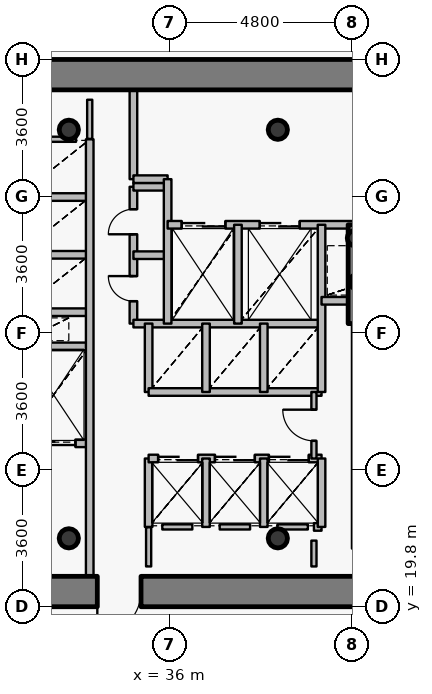
"""IFC4 building model, lengths in metres.
Left out: names, types, materials, properties, quantities, classifications, styles, units other than length and angle.
Written with IfcOpenShell. Run it as: python <this file> out.ifc"""

import sys

from ifc_helpers import new_model, si_unit, direction, frame, frame_2d, origin, origin_2d, place, context, subcontext, project, spatial, rectangle, hollow_circle, extrude, source, transform, mapped, element, fill, save


model = new_model("IFC4")
c1 = context("Model", 3, precision=1e-05, world=origin(), true_north=direction((0.0, 1.0)))
c2 = subcontext(c1, "Body", "Model", "MODEL_VIEW")
j1 = project(units=[si_unit("LENGTHUNIT", "METRE"), si_unit("PLANEANGLEUNIT", "RADIAN")], contexts=[c1])
p1 = place(None, origin())
s1 = spatial("IfcSite", under=j1, at=p1, CompositionType="ELEMENT")
p2 = place(p1, origin())
s2 = spatial("IfcBuilding", under=s1, at=p2, CompositionType="ELEMENT")
p3 = place(p2, frame((0.0, 0.0, 108.45)))
s3 = spatial("IfcBuildingStorey", under=s2, at=p3, CompositionType="ELEMENT", Elevation=108.45)
for number, where, z_axis, x_axis in (
    (1, (33.35, 21.6, 0.0), (0.0, 0.0, 1.0), (1.0, 0.0, 0.0)),
    (2, (38.85, 21.6, 0.0), (0.0, 0.0, 1.0), (1.0, 0.0, 0.0)),
    (3, (38.85, 32.35, 0.0), (0.0, 0.0, 1.0), (1.0, 0.0, 0.0)),
    (4, (33.35, 32.35, 0.0), (0.0, 0.0, 1.0), (1.0, 0.0, 0.0)),
):
    element("IfcColumn", number, at=place(p3, frame(where, z_axis=z_axis, x_axis=x_axis)), inside=s3, PredefinedType="COLUMN", context=c2, shape_type="SweptSolid", body=[
        extrude(hollow_circle(Radius=0.254, WallThickness=0.02, at=origin_2d()), origin(), (0.0, 0.0, 1.0), 3.75),
    ])
for number, where, z_axis, x_axis in (
    (5, (40.95, 28.35, 0.0), (0.0, 0.0, 1.0), (1.0, 0.0, 0.0)),
    (6, (40.88, 29.5, 0.0), (0.0, 0.0, 1.0), (1.0, 0.0, 0.0)),
):
    element("IfcColumn", number, at=place(p3, frame(where, z_axis=z_axis, x_axis=x_axis)), inside=s3, PredefinedType="COLUMN", context=c2, shape_type="SweptSolid", body=[
        extrude(hollow_circle(Radius=0.203, WallThickness=0.016, at=origin_2d()), origin(), (0.0, 0.0, 1.0), 3.75),
    ])
p4 = place(p3, frame((26.6, 33.8, 0.0), z_axis=(0.0, 0.0, 1.0), x_axis=(1.0, 0.0, 0.0)))
e7 = element("IfcWall", 7, at=p4, inside=s3, PredefinedType="SHEAR", context=c2, shape_type="SweptSolid", body=[
    extrude(rectangle(XDim=18.8, YDim=0.8, at=frame_2d((9.4, 0.0))), origin(), (0.0, 0.0, 1.0), 2.95),
])
p5 = place(p3, frame((45.4, 20.2, 0.0), z_axis=(0.0, 0.0, 1.0), x_axis=(-1.0, 0.0, 0.0)))
e8 = element("IfcWall", 8, at=p5, inside=s3, PredefinedType="SHEAR", context=c2, shape_type="SweptSolid", body=[
    extrude(rectangle(XDim=18.8, YDim=0.8, at=frame_2d((9.4, 0.0))), origin(), (0.0, 0.0, 1.0), 2.95),
])
p6 = place(p5, frame((10.15, 0.0, 0.0)))
e9 = element("IfcOpeningElement", 9, at=p6, cuts=e8, PredefinedType="OPENING", context=c2, shape_type="SweptSolid", body=[
    extrude(rectangle(XDim=1.15, YDim=2.15, at=origin_2d()), frame((0.575, 0.41, 1.075), z_axis=(0.0, -1.0, 0.0), x_axis=(1.0, 0.0, 0.0)), (0.0, 0.0, 1.0), 0.82),
])
p7 = place(p3, frame((40.9, 27.25, 0.0), z_axis=(0.0, 0.0, 1.0), x_axis=(0.0, 1.0, 0.0)))
e10 = element("IfcWall", 10, at=p7, inside=s3, PredefinedType="SHEAR", context=c2, shape_type="SweptSolid", body=[
    extrude(rectangle(XDim=2.6, YDim=0.4, at=frame_2d((1.3, 0.0))), origin(), (0.0, 0.0, 1.0), 3.1),
])
p8 = place(p3, frame((32.0, 24.1, 0.0), z_axis=(0.0, 0.0, 1.0), x_axis=(1.0, 0.0, 0.0)))
e11 = element("IfcWall", 11, at=p8, inside=s3, PredefinedType="PARTITIONING", context=c2, shape_type="SweptSolid", body=[
    extrude(rectangle(XDim=1.9, YDim=0.2, at=frame_2d((0.95, 0.0))), origin(), (0.0, 0.0, 1.0), 3.085),
])
p9 = place(p8, frame((0.375, 0.0, 0.0)))
e12 = element("IfcOpeningElement", 12, at=p9, cuts=e11, PredefinedType="OPENING", context=c2, shape_type="SweptSolid", body=[
    extrude(rectangle(XDim=1.15, YDim=2.15, at=origin_2d()), frame((0.575, 0.11, 1.075), z_axis=(0.0, -1.0, 0.0), x_axis=(1.0, 0.0, 0.0)), (0.0, 0.0, 1.0), 0.22),
])
for number, where, z_axis, x_axis in (
    (13, (32.0, 26.65, 0.0), (0.0, 0.0, 1.0), (1.0, 0.0, 0.0)),
    (14, (32.0, 27.55, 0.0), (0.0, 0.0, 1.0), (1.0, 0.0, 0.0)),
    (15, (32.0, 29.06, 0.0), (0.0, 0.0, 1.0), (1.0, 0.0, 0.0)),
    (16, (32.0, 30.58, 0.0), (0.0, 0.0, 1.0), (1.0, 0.0, 0.0)),
):
    element("IfcWall", number, at=place(p3, frame(where, z_axis=z_axis, x_axis=x_axis)), inside=s3, PredefinedType="PARTITIONING", context=c2, shape_type="SweptSolid", body=[
        extrude(rectangle(XDim=1.9, YDim=0.2, at=frame_2d((0.95, 0.0))), origin(), (0.0, 0.0, 1.0), 3.085),
    ])
p10 = place(p3, frame((33.9, 20.6, 0.0), z_axis=(0.0, 0.0, 1.0), x_axis=(0.0, 1.0, 0.0)))
e17 = element("IfcWall", 17, at=p10, inside=s3, PredefinedType="PARTITIONING", context=c2, shape_type="SweptSolid", body=[
    extrude(rectangle(XDim=11.5, YDim=0.2, at=frame_2d((5.75, 0.0))), origin(), (0.0, 0.0, 1.0), 3.085),
])
p11 = place(p3, frame((35.05, 27.25, 0.0), z_axis=(0.0, 0.0, 1.0), x_axis=(0.0, 1.0, 0.0)))
e18 = element("IfcWall", 18, at=p11, inside=s3, PredefinedType="PARTITIONING", context=c2, shape_type="SweptSolid", body=[
    extrude(rectangle(XDim=3.6, YDim=0.2, at=frame_2d((1.8, 0.0))), origin(), (0.0, 0.0, 1.0), 3.5),
])
p12 = place(p11, frame((0.59, 0.0, 0.0)))
e19 = element("IfcOpeningElement", 19, at=p12, cuts=e18, PredefinedType="OPENING", context=c2, shape_type="SweptSolid", body=[
    extrude(rectangle(XDim=0.66, YDim=2.05, at=origin_2d()), frame((0.33, 0.11, 1.025), z_axis=(0.0, -1.0, 0.0), x_axis=(1.0, 0.0, 0.0)), (0.0, 0.0, 1.0), 0.22),
])
p13 = place(p11, frame((2.35, 0.0, 0.0)))
e20 = element("IfcOpeningElement", 20, at=p13, cuts=e18, PredefinedType="OPENING", context=c2, shape_type="SweptSolid", body=[
    extrude(rectangle(XDim=0.66, YDim=2.05, at=origin_2d()), frame((0.33, 0.11, 1.025), z_axis=(0.0, -1.0, 0.0), x_axis=(1.0, 0.0, 0.0)), (0.0, 0.0, 1.0), 0.22),
])
p14 = place(p3, frame((35.05, 27.25, 0.0), z_axis=(0.0, 0.0, 1.0), x_axis=(1.0, 0.0, 0.0)))
e21 = element("IfcWall", 21, at=p14, inside=s3, PredefinedType="PARTITIONING", context=c2, shape_type="SweptSolid", body=[
    extrude(rectangle(XDim=4.95, YDim=0.2, at=frame_2d((2.475, 0.0))), origin(), (0.0, 0.0, 1.0), 3.085),
])
for number, where, z_axis, x_axis in (
    (22, (35.05, 29.05, 0.0), (0.0, 0.0, 1.0), (1.0, 0.0, 0.0)),
    (23, (35.05, 30.85, 0.0), (0.0, 0.0, 1.0), (1.0, 0.0, 0.0)),
):
    element("IfcWall", number, at=place(p3, frame(where, z_axis=z_axis, x_axis=x_axis)), inside=s3, PredefinedType="PARTITIONING", context=c2, shape_type="SweptSolid", body=[
        extrude(rectangle(XDim=0.9, YDim=0.2, at=frame_2d((0.45, 0.0))), origin(), (0.0, 0.0, 1.0), 3.5),
    ])
p15 = place(p3, frame((35.05, 31.05, 0.0), z_axis=(0.0, 0.0, 1.0), x_axis=(0.0, 1.0, 0.0)))
e24 = element("IfcWall", 24, at=p15, inside=s3, PredefinedType="PARTITIONING", context=c2, shape_type="SweptSolid", body=[
    extrude(rectangle(XDim=2.35, YDim=0.2, at=frame_2d((1.175, 0.0))), origin(), (0.0, 0.0, 1.0), 3.085),
])
p16 = place(p3, frame((35.05, 31.05, 0.0), z_axis=(0.0, 0.0, 1.0), x_axis=(1.0, 0.0, 0.0)))
e25 = element("IfcWall", 25, at=p16, inside=s3, PredefinedType="PARTITIONING", context=c2, shape_type="SweptSolid", body=[
    extrude(rectangle(XDim=0.9, YDim=0.2, at=frame_2d((0.45, 0.0))), origin(), (0.0, 0.0, 1.0), 3.5),
])
p17 = place(p3, frame((35.45, 21.9, 0.0), z_axis=(0.0, 0.0, 1.0), x_axis=(0.0, 1.0, 0.0)))
e26 = element("IfcWall", 26, at=p17, inside=s3, PredefinedType="PARTITIONING", context=c2, shape_type="SweptSolid", body=[
    extrude(rectangle(XDim=1.8, YDim=0.2, at=frame_2d((0.9, 0.0))), origin(), (0.0, 0.0, 1.0), 3.5),
])
p18 = place(p3, frame((35.45, 23.7, 0.0), z_axis=(0.0, 0.0, 1.0), x_axis=(1.0, 0.0, 0.0)))
e27 = element("IfcWall", 27, at=p18, inside=s3, PredefinedType="PARTITIONING", context=c2, shape_type="SweptSolid", body=[
    extrude(rectangle(XDim=4.55, YDim=0.2, at=frame_2d((2.275, 0.0))), origin(), (0.0, 0.0, 1.0), 3.085),
])
p19 = place(p18, frame((0.25, 0.0, 0.0)))
e28 = element("IfcOpeningElement", 28, at=p19, cuts=e27, PredefinedType="OPENING", context=c2, shape_type="SweptSolid", body=[
    extrude(rectangle(XDim=1.05, YDim=2.15, at=origin_2d()), frame((0.525, 0.11, 1.075), z_axis=(0.0, -1.0, 0.0), x_axis=(1.0, 0.0, 0.0)), (0.0, 0.0, 1.0), 0.22),
])
p20 = place(p18, frame((1.745, 0.0, 0.0)))
e29 = element("IfcOpeningElement", 29, at=p20, cuts=e27, PredefinedType="OPENING", context=c2, shape_type="SweptSolid", body=[
    extrude(rectangle(XDim=1.05, YDim=2.15, at=origin_2d()), frame((0.525, 0.11, 1.075), z_axis=(0.0, -1.0, 0.0), x_axis=(1.0, 0.0, 0.0)), (0.0, 0.0, 1.0), 0.22),
])
p21 = place(p18, frame((3.165, 0.0, 0.0)))
e30 = element("IfcOpeningElement", 30, at=p21, cuts=e27, PredefinedType="OPENING", context=c2, shape_type="SweptSolid", body=[
    extrude(rectangle(XDim=1.05, YDim=2.15, at=origin_2d()), frame((0.525, 0.11, 1.075), z_axis=(0.0, -1.0, 0.0), x_axis=(1.0, 0.0, 0.0)), (0.0, 0.0, 1.0), 0.22),
])
p22 = place(p3, frame((35.45, 25.45, 0.0), z_axis=(0.0, 0.0, 1.0), x_axis=(0.0, 1.0, 0.0)))
e31 = element("IfcWall", 31, at=p22, inside=s3, PredefinedType="PARTITIONING", context=c2, shape_type="SweptSolid", body=[
    extrude(rectangle(XDim=1.8, YDim=0.2, at=frame_2d((0.9, 0.0))), origin(), (0.0, 0.0, 1.0), 3.5),
])
p23 = place(p3, frame((35.45, 25.45, 0.0), z_axis=(0.0, 0.0, 1.0), x_axis=(1.0, 0.0, 0.0)))
e32 = element("IfcWall", 32, at=p23, inside=s3, PredefinedType="PARTITIONING", context=c2, shape_type="SweptSolid", body=[
    extrude(rectangle(XDim=4.55, YDim=0.2, at=frame_2d((2.275, 0.0))), origin(), (0.0, 0.0, 1.0), 3.085),
])
p24 = place(p3, frame((35.95, 27.25, 0.0), z_axis=(0.0, 0.0, 1.0), x_axis=(0.0, 1.0, 0.0)))
e33 = element("IfcWall", 33, at=p24, inside=s3, PredefinedType="PARTITIONING", context=c2, shape_type="SweptSolid", body=[
    extrude(rectangle(XDim=3.8, YDim=0.2, at=frame_2d((1.9, 0.0))), origin(), (0.0, 0.0, 1.0), 3.5),
])
p25 = place(p3, frame((35.95, 29.85, 0.0), z_axis=(0.0, 0.0, 1.0), x_axis=(1.0, 0.0, 0.0)))
e34 = element("IfcWall", 34, at=p25, inside=s3, PredefinedType="PARTITIONING", context=c2, shape_type="SweptSolid", body=[
    extrude(rectangle(XDim=8.49, YDim=0.2, at=frame_2d((4.245, 0.0))), origin(), (0.0, 0.0, 1.0), 3.085),
])
p26 = place(p25, frame((6.1, 0.0, 0.0)))
e35 = element("IfcOpeningElement", 35, at=p26, cuts=e34, PredefinedType="OPENING", context=c2, shape_type="SweptSolid", body=[
    extrude(rectangle(XDim=1.2, YDim=2.15, at=origin_2d()), frame((0.6, 0.11, 1.075), z_axis=(0.0, -1.0, 0.0), x_axis=(1.0, 0.0, 0.0)), (0.0, 0.0, 1.0), 0.22),
])
p27 = place(p25, frame((0.37, 0.0, 0.0)))
e36 = element("IfcOpeningElement", 36, at=p27, cuts=e34, PredefinedType="OPENING", context=c2, shape_type="SweptSolid", body=[
    extrude(rectangle(XDim=1.15, YDim=2.15, at=origin_2d()), frame((0.575, 0.11, 1.075), z_axis=(0.0, -1.0, 0.0), x_axis=(1.0, 0.0, 0.0)), (0.0, 0.0, 1.0), 0.22),
])
p28 = place(p25, frame((2.425, 0.0, 0.0)))
e37 = element("IfcOpeningElement", 37, at=p28, cuts=e34, PredefinedType="OPENING", context=c2, shape_type="SweptSolid", body=[
    extrude(rectangle(XDim=1.05, YDim=2.15, at=origin_2d()), frame((0.525, 0.11, 1.075), z_axis=(0.0, -1.0, 0.0), x_axis=(1.0, 0.0, 0.0)), (0.0, 0.0, 1.0), 0.22),
])
for number, where, z_axis, x_axis in (
    (38, (36.96, 21.9, 0.0), (0.0, 0.0, 1.0), (0.0, 1.0, 0.0)),
    (39, (36.96, 25.45, 0.0), (0.0, 0.0, 1.0), (0.0, 1.0, 0.0)),
):
    element("IfcWall", number, at=place(p3, frame(where, z_axis=z_axis, x_axis=x_axis)), inside=s3, PredefinedType="PARTITIONING", context=c2, shape_type="SweptSolid", body=[
        extrude(rectangle(XDim=1.8, YDim=0.2, at=frame_2d((0.9, 0.0))), origin(), (0.0, 0.0, 1.0), 3.5),
    ])
p29 = place(p3, frame((37.8, 27.25, 0.0), z_axis=(0.0, 0.0, 1.0), x_axis=(0.0, 1.0, 0.0)))
e40 = element("IfcWall", 40, at=p29, inside=s3, PredefinedType="PARTITIONING", context=c2, shape_type="SweptSolid", body=[
    extrude(rectangle(XDim=2.6, YDim=0.2, at=frame_2d((1.3, 0.0))), origin(), (0.0, 0.0, 1.0), 3.5),
])
for number, where, z_axis, x_axis in (
    (41, (38.48, 21.9, 0.0), (0.0, 0.0, 1.0), (0.0, 1.0, 0.0)),
    (42, (38.48, 25.45, 0.0), (0.0, 0.0, 1.0), (0.0, 1.0, 0.0)),
):
    element("IfcWall", number, at=place(p3, frame(where, z_axis=z_axis, x_axis=x_axis)), inside=s3, PredefinedType="PARTITIONING", context=c2, shape_type="SweptSolid", body=[
        extrude(rectangle(XDim=1.8, YDim=0.2, at=frame_2d((0.9, 0.0))), origin(), (0.0, 0.0, 1.0), 3.5),
    ])
p30 = place(p3, frame((39.8, 21.9, 0.0), z_axis=(0.0, 0.0, 1.0), x_axis=(1.0, 0.0, 0.0)))
e43 = element("IfcWall", 43, at=p30, inside=s3, PredefinedType="PARTITIONING", context=c2, shape_type="SweptSolid", body=[
    extrude(rectangle(XDim=0.2, YDim=0.2, at=frame_2d((0.1, 0.0))), origin(), (0.0, 0.0, 1.0), 3.5),
])
p31 = place(p3, frame((39.8, 23.7, 0.0), z_axis=(0.0, 0.0, 1.0), x_axis=(0.0, 1.0, 0.0)))
e44 = element("IfcWall", 44, at=p31, inside=s3, PredefinedType="PARTITIONING", context=c2, shape_type="SweptSolid", body=[
    extrude(rectangle(XDim=1.75, YDim=0.135, at=frame_2d((0.875, 0.0))), origin(), (0.0, 0.0, 1.0), 3.5),
])
p32 = place(p31, frame((0.465, 0.0, 0.0)))
e45 = element("IfcOpeningElement", 45, at=p32, cuts=e44, PredefinedType="OPENING", context=c2, shape_type="SweptSolid", body=[
    extrude(rectangle(XDim=0.82, YDim=2.1, at=origin_2d()), frame((0.41, 0.078, 1.05), z_axis=(0.0, -1.0, 0.0), x_axis=(1.0, 0.0, 0.0)), (0.0, 0.0, 1.0), 0.155),
])
p33 = place(p3, frame((40.0, 21.9, 0.0), z_axis=(0.0, 0.0, 1.0), x_axis=(0.0, 1.0, 0.0)))
e46 = element("IfcWall", 46, at=p33, inside=s3, PredefinedType="PARTITIONING", context=c2, shape_type="SweptSolid", body=[
    extrude(rectangle(XDim=1.8, YDim=0.2, at=frame_2d((0.9, 0.0))), origin(), (0.0, 0.0, 1.0), 3.5),
])
p34 = place(p3, frame((40.0, 25.45, 0.0), z_axis=(0.0, 0.0, 1.0), x_axis=(0.0, 1.0, 0.0)))
e47 = element("IfcWall", 47, at=p34, inside=s3, PredefinedType="PARTITIONING", context=c2, shape_type="SweptSolid", body=[
    extrude(rectangle(XDim=4.4, YDim=0.2, at=frame_2d((2.2, 0.0))), origin(), (0.0, 0.0, 1.0), 3.5),
])
p35 = place(p3, frame((40.0, 27.85, 0.0), z_axis=(0.0, 0.0, 1.0), x_axis=(1.0, 0.0, 0.0)))
e48 = element("IfcWall", 48, at=p35, inside=s3, PredefinedType="PARTITIONING", context=c2, shape_type="SweptSolid", body=[
    extrude(rectangle(XDim=0.9, YDim=0.2, at=frame_2d((0.45, 0.0))), origin(), (0.0, 0.0, 1.0), 3.5),
])
p36 = place(p3, frame((40.9, 21.33, 0.0), z_axis=(0.0, 0.0, 1.0), x_axis=(0.0, 1.0, 0.0)))
e49 = element("IfcWall", 49, at=p36, inside=s3, PredefinedType="PARTITIONING", context=c2, shape_type="SweptSolid", body=[
    extrude(rectangle(XDim=5.91, YDim=0.2, at=frame_2d((2.955, 0.0))), origin(), (0.0, 0.0, 1.0), 3.035),
])
p37 = place(p3, frame((36.6, 21.9, 0.0), z_axis=(0.0, 0.0, 1.0), x_axis=(-1.0, 0.0, 0.0)))
e50 = element("IfcWall", 50, at=p37, inside=s3, PredefinedType="PARTITIONING", context=c2, shape_type="SweptSolid", body=[
    extrude(rectangle(XDim=0.79, YDim=0.135, at=frame_2d((0.395, 0.0))), origin(), (0.0, 0.0, 1.0), 3.5),
])
p38 = place(p3, frame((38.12, 21.9, 0.0), z_axis=(0.0, 0.0, 1.0), x_axis=(-1.0, 0.0, 0.0)))
e51 = element("IfcWall", 51, at=p38, inside=s3, PredefinedType="PARTITIONING", context=c2, shape_type="SweptSolid", body=[
    extrude(rectangle(XDim=0.8, YDim=0.135, at=frame_2d((0.4, 0.0))), origin(), (0.0, 0.0, 1.0), 3.5),
])
p39 = place(p3, frame((39.64, 21.9, 0.0), z_axis=(0.0, 0.0, 1.0), x_axis=(-1.0, 0.0, 0.0)))
e52 = element("IfcWall", 52, at=p39, inside=s3, PredefinedType="PARTITIONING", context=c2, shape_type="SweptSolid", body=[
    extrude(rectangle(XDim=0.8, YDim=0.135, at=frame_2d((0.4, 0.0))), origin(), (0.0, 0.0, 1.0), 3.085),
])
p40 = place(p3, frame((32.36, 32.1, 0.0), z_axis=(0.0, 0.0, 1.0), x_axis=(1.0, 0.0, 0.0)))
e53 = element("IfcWall", 53, at=p40, inside=s3, PredefinedType="PARTITIONING", context=c2, shape_type="SweptSolid", body=[
    extrude(rectangle(XDim=1.18, YDim=0.135, at=frame_2d((0.59, 0.0))), origin(), (0.0, 0.0, 1.0), 3.085),
])
p41 = place(p3, frame((39.8, 20.86, 0.0), z_axis=(0.0, 0.0, 1.0), x_axis=(0.0, 1.0, 0.0)))
e54 = element("IfcWall", 54, at=p41, inside=s3, PredefinedType="PARTITIONING", context=c2, shape_type="SweptSolid", body=[
    extrude(rectangle(XDim=0.68, YDim=0.135, at=frame_2d((0.34, 0.0))), origin(), (0.0, 0.0, 1.0), 3.035),
])
for number, where, z_axis, x_axis in (
    (55, (35.45, 21.89, 0.0), (0.0, 0.0, 1.0), (0.0, -1.0, 0.0)),
    (56, (33.9, 32.11, 0.0), (0.0, 0.0, 1.0), (0.0, 1.0, 0.0)),
):
    element("IfcWall", number, at=place(p3, frame(where, z_axis=z_axis, x_axis=x_axis)), inside=s3, PredefinedType="PARTITIONING", context=c2, shape_type="SweptSolid", body=[
        extrude(rectangle(XDim=1.03, YDim=0.135, at=frame_2d((0.515, 0.0))), origin(), (0.0, 0.0, 1.0), 3.085),
    ])
m1 = source(origin(), c2, "Body", "SweptSolid", [
    extrude(rectangle(XDim=1.15, YDim=2.15, at=origin_2d()), frame((0.575, 0.025, 1.075), z_axis=(0.0, -1.0, 0.0), x_axis=(1.0, 0.0, 0.0)), (0.0, 0.0, 1.0), 0.05),
])
p42 = place(p6, origin())
e57 = element("IfcDoor", 57, at=p42, inside=s3, OperationType="SINGLE_SWING_RIGHT", PredefinedType="DOOR", context=c2, shape_type="MappedRepresentation", body=[
    mapped(m1, transform((0.0, 0.0, 0.0), x_axis=(1.0, 0.0, 0.0), y_axis=(0.0, 1.0, 0.0), z_axis=(0.0, 0.0, 1.0), scale=1.0)),
])
fill(e9, e57)
m2 = source(origin(), c2, "Body", "SweptSolid", [
    extrude(rectangle(XDim=1.15, YDim=2.15, at=origin_2d()), frame((0.575, 0.025, 1.075), z_axis=(0.0, -1.0, 0.0), x_axis=(1.0, 0.0, 0.0)), (0.0, 0.0, 1.0), 0.05),
])
p43 = place(p27, origin())
e58 = element("IfcDoor", 58, at=p43, inside=s3, OperationType="DOUBLE_DOOR_SLIDING", PredefinedType="USERDEFINED", context=c2, shape_type="MappedRepresentation", body=[
    mapped(m2, transform((0.0, 0.0, 0.0), x_axis=(1.0, 0.0, 0.0), y_axis=(0.0, 1.0, 0.0), z_axis=(0.0, 0.0, 1.0), scale=1.0)),
])
fill(e36, e58)
p44 = place(p9, origin())
e59 = element("IfcDoor", 59, at=p44, inside=s3, OperationType="DOUBLE_DOOR_SLIDING", PredefinedType="USERDEFINED", context=c2, shape_type="MappedRepresentation", body=[
    mapped(m2, transform((0.0, 0.0, 0.0), x_axis=(1.0, 0.0, 0.0), y_axis=(0.0, 1.0, 0.0), z_axis=(0.0, 0.0, 1.0), scale=1.0)),
])
fill(e12, e59)
m3 = source(origin(), c2, "Body", "SweptSolid", [
    extrude(rectangle(XDim=1.05, YDim=2.15, at=origin_2d()), frame((0.525, 0.025, 1.075), z_axis=(0.0, -1.0, 0.0), x_axis=(1.0, 0.0, 0.0)), (0.0, 0.0, 1.0), 0.05),
])
p45 = place(p28, origin())
e60 = element("IfcDoor", 60, at=p45, inside=s3, OperationType="DOUBLE_DOOR_SLIDING", PredefinedType="USERDEFINED", context=c2, shape_type="MappedRepresentation", body=[
    mapped(m3, transform((0.0, 0.0, 0.0), x_axis=(1.0, 0.0, 0.0), y_axis=(0.0, 1.0, 0.0), z_axis=(0.0, 0.0, 1.0), scale=1.0)),
])
fill(e37, e60)
p46 = place(p19, origin())
e61 = element("IfcDoor", 61, at=p46, inside=s3, OperationType="DOUBLE_DOOR_SLIDING", PredefinedType="USERDEFINED", context=c2, shape_type="MappedRepresentation", body=[
    mapped(m3, transform((0.0, 0.0, 0.0), x_axis=(1.0, 0.0, 0.0), y_axis=(0.0, 1.0, 0.0), z_axis=(0.0, 0.0, 1.0), scale=1.0)),
])
fill(e28, e61)
p47 = place(p20, origin())
e62 = element("IfcDoor", 62, at=p47, inside=s3, OperationType="DOUBLE_DOOR_SLIDING", PredefinedType="USERDEFINED", context=c2, shape_type="MappedRepresentation", body=[
    mapped(m3, transform((0.0, 0.0, 0.0), x_axis=(1.0, 0.0, 0.0), y_axis=(0.0, 1.0, 0.0), z_axis=(0.0, 0.0, 1.0), scale=1.0)),
])
fill(e29, e62)
p48 = place(p21, origin())
e63 = element("IfcDoor", 63, at=p48, inside=s3, OperationType="DOUBLE_DOOR_SLIDING", PredefinedType="USERDEFINED", context=c2, shape_type="MappedRepresentation", body=[
    mapped(m3, transform((0.0, 0.0, 0.0), x_axis=(1.0, 0.0, 0.0), y_axis=(0.0, 1.0, 0.0), z_axis=(0.0, 0.0, 1.0), scale=1.0)),
])
fill(e30, e63)
m4 = source(origin(), c2, "Body", "SweptSolid", [
    extrude(rectangle(XDim=0.66, YDim=2.05, at=origin_2d()), frame((0.33, 0.025, 1.025), z_axis=(0.0, -1.0, 0.0), x_axis=(1.0, 0.0, 0.0)), (0.0, 0.0, 1.0), 0.05),
])
p49 = place(p12, origin())
e64 = element("IfcDoor", 64, at=p49, inside=s3, OperationType="SINGLE_SWING_RIGHT", PredefinedType="USERDEFINED", context=c2, shape_type="MappedRepresentation", body=[
    mapped(m4, transform((0.0, 0.0, 0.0), x_axis=(1.0, 0.0, 0.0), y_axis=(0.0, 1.0, 0.0), z_axis=(0.0, 0.0, 1.0), scale=1.0)),
])
fill(e19, e64)
p50 = place(p13, origin())
e65 = element("IfcDoor", 65, at=p50, inside=s3, OperationType="SINGLE_SWING_LEFT", PredefinedType="USERDEFINED", context=c2, shape_type="MappedRepresentation", body=[
    mapped(m4, transform((0.0, 0.0, 0.0), x_axis=(1.0, 0.0, 0.0), y_axis=(0.0, 1.0, 0.0), z_axis=(0.0, 0.0, 1.0), scale=1.0)),
])
fill(e20, e65)
m5 = source(origin(), c2, "Body", "SweptSolid", [
    extrude(rectangle(XDim=0.82, YDim=2.1, at=origin_2d()), frame((0.41, 0.025, 1.05), z_axis=(0.0, -1.0, 0.0), x_axis=(1.0, 0.0, 0.0)), (0.0, 0.0, 1.0), 0.05),
])
p51 = place(p32, origin())
e66 = element("IfcDoor", 66, at=p51, inside=s3, OperationType="SINGLE_SWING_RIGHT", PredefinedType="DOOR", context=c2, shape_type="MappedRepresentation", body=[
    mapped(m5, transform((0.0, 0.0, 0.0), x_axis=(1.0, 0.0, 0.0), y_axis=(0.0, 1.0, 0.0), z_axis=(0.0, 0.0, 1.0), scale=1.0)),
])
fill(e45, e66)
save(model, sys.argv[1])
